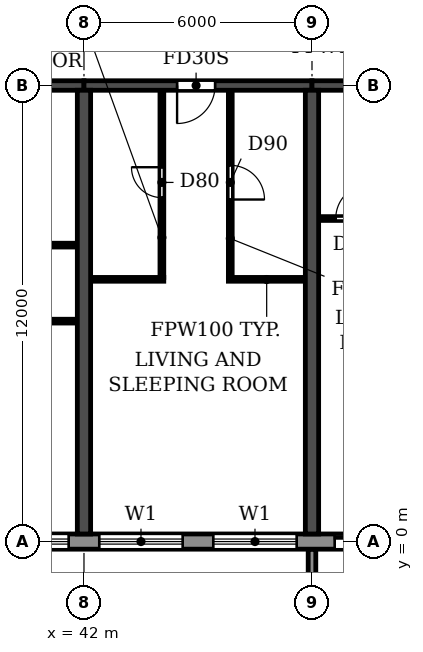
"""IFC4 building model, lengths in metres.
Left out: names, types, materials, properties, quantities, classifications, styles, units other than length and angle.
Written with IfcOpenShell. Run it as: python <this file> out.ifc"""

import sys

from ifc_helpers import new_model, si_unit, direction, frame, frame_2d, origin, place, context, subcontext, project, spatial, polyline, rectangle, outline, extrude, source, transform, mapped, element, fill, save


model = new_model("IFC4")
c1 = context("Model", 3, precision=1e-05, world=origin(), true_north=direction((0.0, 1.0)))
c2 = subcontext(c1, "Body", "Model", "MODEL_VIEW")
j1 = project(units=[si_unit("LENGTHUNIT", "METRE"), si_unit("PLANEANGLEUNIT", "RADIAN")], contexts=[c1])
p1 = place(None, origin())
s1 = spatial("IfcSite", under=j1, at=p1, CompositionType="ELEMENT")
p2 = place(p1, origin())
s2 = spatial("IfcBuilding", under=s1, at=p2, CompositionType="ELEMENT")
p3 = place(p2, frame((0.0, 0.0, 109.2)))
s3 = spatial("IfcBuildingStorey", under=s2, at=p3, CompositionType="ELEMENT", Elevation=109.2)
for number, where, z_axis, x_axis in (
    (1, (42.0, 0.2, 0.0), (0.0, 0.0, 1.0), (0.0, 1.0, 0.0)),
    (2, (48.0, 0.2, 0.0), (0.0, 0.0, 1.0), (0.0, 1.0, 0.0)),
):
    element("IfcWall", number, at=place(p3, frame(where, z_axis=z_axis, x_axis=x_axis)), inside=s3, PredefinedType="SHEAR", context=c2, shape_type="SweptSolid", body=[
        extrude(rectangle(XDim=11.675, YDim=0.35, at=frame_2d((5.837, 0.0))), origin(), (0.0, 0.0, 1.0), 3.06),
    ])
p4 = place(p3, frame((36.0, 12.0, 0.0), z_axis=(0.0, 0.0, 1.0), x_axis=(1.0, 0.0, 0.0)))
e3 = element("IfcWall", 3, at=p4, inside=s3, PredefinedType="SHEAR", context=c2, shape_type="SweptSolid", body=[
    extrude(rectangle(XDim=6.0, YDim=0.25, at=frame_2d((3.0, 0.0))), origin(), (0.0, 0.0, 1.0), 2.46),
])
p5 = place(p3, frame((42.0, 12.0, 0.0), z_axis=(0.0, 0.0, 1.0), x_axis=(1.0, 0.0, 0.0)))
e4 = element("IfcWall", 4, at=p5, inside=s3, PredefinedType="SHEAR", context=c2, shape_type="SweptSolid", body=[
    extrude(rectangle(XDim=6.0, YDim=0.25, at=frame_2d((3.0, 0.0))), origin(), (0.0, 0.0, 1.0), 2.46),
])
p6 = place(p5, frame((2.45, 0.0, 0.0)))
e5 = element("IfcOpeningElement", 5, at=p6, cuts=e4, PredefinedType="OPENING", context=c2, shape_type="SweptSolid", body=[
    extrude(rectangle(XDim=1.0, YDim=2.1, at=frame_2d((0.5, 1.05))), frame((0.0, 0.135, 0.0), z_axis=(0.0, -1.0, 0.0), x_axis=(1.0, 0.0, 0.0)), (0.0, 0.0, 1.0), 0.27),
])
p7 = place(p3, frame((48.0, 12.0, 0.0), z_axis=(0.0, 0.0, 1.0), x_axis=(1.0, 0.0, 0.0)))
e6 = element("IfcWall", 6, at=p7, inside=s3, PredefinedType="SHEAR", context=c2, shape_type="SweptSolid", body=[
    extrude(rectangle(XDim=6.0, YDim=0.25, at=frame_2d((3.0, 0.0))), origin(), (0.0, 0.0, 1.0), 2.46),
])
p8 = place(p7, frame((2.55, 0.0, 0.0)))
e7 = element("IfcOpeningElement", 7, at=p8, cuts=e6, PredefinedType="OPENING", context=c2, shape_type="SweptSolid", body=[
    extrude(rectangle(XDim=1.0, YDim=2.1, at=frame_2d((0.5, 1.05))), frame((0.0, 0.135, 0.0), z_axis=(0.0, -1.0, 0.0), x_axis=(1.0, 0.0, 0.0)), (0.0, 0.0, 1.0), 0.27),
])
p9 = place(p3, frame((16.683, 0.0, 0.0), z_axis=(0.0, 0.0, 1.0), x_axis=(1.0, 0.0, 0.0)))
e8 = element("IfcWall", 8, at=p9, inside=s3, PredefinedType="STANDARD", context=c2, shape_type="SweptSolid", body=[
    extrude(rectangle(XDim=68.634, YDim=0.4, at=frame_2d((34.317, 0.0))), origin(), (0.0, 0.0, 1.0), 3.06),
])
p10 = place(p9, frame((1.717, 0.0, 0.9)))
e9 = element("IfcOpeningElement", 9, at=p10, cuts=e8, PredefinedType="OPENING", context=c2, shape_type="SweptSolid", body=[
    extrude(rectangle(XDim=2.2, YDim=1.5, at=frame_2d((1.1, 0.75))), frame((0.0, 0.21, 0.0), z_axis=(0.0, -1.0, 0.0), x_axis=(1.0, 0.0, 0.0)), (0.0, 0.0, 1.0), 0.42),
])
p11 = place(p9, frame((4.717, 0.0, 0.9)))
e10 = element("IfcOpeningElement", 10, at=p11, cuts=e8, PredefinedType="OPENING", context=c2, shape_type="SweptSolid", body=[
    extrude(rectangle(XDim=2.2, YDim=1.5, at=frame_2d((1.1, 0.75))), frame((0.0, 0.21, 0.0), z_axis=(0.0, -1.0, 0.0), x_axis=(1.0, 0.0, 0.0)), (0.0, 0.0, 1.0), 0.42),
])
p12 = place(p9, frame((7.717, 0.0, 0.9)))
e11 = element("IfcOpeningElement", 11, at=p12, cuts=e8, PredefinedType="OPENING", context=c2, shape_type="SweptSolid", body=[
    extrude(rectangle(XDim=2.2, YDim=1.5, at=frame_2d((1.1, 0.75))), frame((0.0, 0.21, 0.0), z_axis=(0.0, -1.0, 0.0), x_axis=(1.0, 0.0, 0.0)), (0.0, 0.0, 1.0), 0.42),
])
p13 = place(p9, frame((10.917, 0.0, 0.0)))
e12 = element("IfcOpeningElement", 12, at=p13, cuts=e8, PredefinedType="OPENING", context=c2, shape_type="SweptSolid", body=[
    extrude(rectangle(XDim=1.8, YDim=2.4, at=frame_2d((0.9, 1.2))), frame((0.0, 0.21, 0.0), z_axis=(0.0, -1.0, 0.0), x_axis=(1.0, 0.0, 0.0)), (0.0, 0.0, 1.0), 0.42),
])
p14 = place(p9, frame((13.717, 0.0, 0.9)))
e13 = element("IfcOpeningElement", 13, at=p14, cuts=e8, PredefinedType="OPENING", context=c2, shape_type="SweptSolid", body=[
    extrude(rectangle(XDim=2.2, YDim=1.5, at=frame_2d((1.1, 0.75))), frame((0.0, 0.21, 0.0), z_axis=(0.0, -1.0, 0.0), x_axis=(1.0, 0.0, 0.0)), (0.0, 0.0, 1.0), 0.42),
])
p15 = place(p9, frame((16.717, 0.0, 0.9)))
e14 = element("IfcOpeningElement", 14, at=p15, cuts=e8, PredefinedType="OPENING", context=c2, shape_type="SweptSolid", body=[
    extrude(rectangle(XDim=2.2, YDim=1.5, at=frame_2d((1.1, 0.75))), frame((0.0, 0.21, 0.0), z_axis=(0.0, -1.0, 0.0), x_axis=(1.0, 0.0, 0.0)), (0.0, 0.0, 1.0), 0.42),
])
p16 = place(p9, frame((19.717, 0.0, 0.9)))
e15 = element("IfcOpeningElement", 15, at=p16, cuts=e8, PredefinedType="OPENING", context=c2, shape_type="SweptSolid", body=[
    extrude(rectangle(XDim=2.2, YDim=1.5, at=frame_2d((1.1, 0.75))), frame((0.0, 0.21, 0.0), z_axis=(0.0, -1.0, 0.0), x_axis=(1.0, 0.0, 0.0)), (0.0, 0.0, 1.0), 0.42),
])
p17 = place(p9, frame((22.717, 0.0, 0.9)))
e16 = element("IfcOpeningElement", 16, at=p17, cuts=e8, PredefinedType="OPENING", context=c2, shape_type="SweptSolid", body=[
    extrude(rectangle(XDim=2.2, YDim=1.5, at=frame_2d((1.1, 0.75))), frame((0.0, 0.21, 0.0), z_axis=(0.0, -1.0, 0.0), x_axis=(1.0, 0.0, 0.0)), (0.0, 0.0, 1.0), 0.42),
])
p18 = place(p9, frame((25.717, 0.0, 0.9)))
e17 = element("IfcOpeningElement", 17, at=p18, cuts=e8, PredefinedType="OPENING", context=c2, shape_type="SweptSolid", body=[
    extrude(rectangle(XDim=2.2, YDim=1.5, at=frame_2d((1.1, 0.75))), frame((0.0, 0.21, 0.0), z_axis=(0.0, -1.0, 0.0), x_axis=(1.0, 0.0, 0.0)), (0.0, 0.0, 1.0), 0.42),
])
p19 = place(p9, frame((28.717, 0.0, 0.9)))
e18 = element("IfcOpeningElement", 18, at=p19, cuts=e8, PredefinedType="OPENING", context=c2, shape_type="SweptSolid", body=[
    extrude(rectangle(XDim=2.2, YDim=1.5, at=frame_2d((1.1, 0.75))), frame((0.0, 0.21, 0.0), z_axis=(0.0, -1.0, 0.0), x_axis=(1.0, 0.0, 0.0)), (0.0, 0.0, 1.0), 0.42),
])
p20 = place(p9, frame((31.917, 0.0, 0.0)))
e19 = element("IfcOpeningElement", 19, at=p20, cuts=e8, PredefinedType="OPENING", context=c2, shape_type="SweptSolid", body=[
    extrude(rectangle(XDim=1.8, YDim=2.4, at=frame_2d((0.9, 1.2))), frame((0.0, 0.21, 0.0), z_axis=(0.0, -1.0, 0.0), x_axis=(1.0, 0.0, 0.0)), (0.0, 0.0, 1.0), 0.42),
])
p21 = place(p9, frame((34.717, 0.0, 0.9)))
e20 = element("IfcOpeningElement", 20, at=p21, cuts=e8, PredefinedType="OPENING", context=c2, shape_type="SweptSolid", body=[
    extrude(rectangle(XDim=2.2, YDim=1.5, at=frame_2d((1.1, 0.75))), frame((0.0, 0.21, 0.0), z_axis=(0.0, -1.0, 0.0), x_axis=(1.0, 0.0, 0.0)), (0.0, 0.0, 1.0), 0.42),
])
p22 = place(p9, frame((37.717, 0.0, 0.9)))
e21 = element("IfcOpeningElement", 21, at=p22, cuts=e8, PredefinedType="OPENING", context=c2, shape_type="SweptSolid", body=[
    extrude(rectangle(XDim=2.2, YDim=1.5, at=frame_2d((1.1, 0.75))), frame((0.0, 0.21, 0.0), z_axis=(0.0, -1.0, 0.0), x_axis=(1.0, 0.0, 0.0)), (0.0, 0.0, 1.0), 0.42),
])
p23 = place(p9, frame((40.717, 0.0, 0.9)))
e22 = element("IfcOpeningElement", 22, at=p23, cuts=e8, PredefinedType="OPENING", context=c2, shape_type="SweptSolid", body=[
    extrude(rectangle(XDim=2.2, YDim=1.5, at=frame_2d((1.1, 0.75))), frame((0.0, 0.21, 0.0), z_axis=(0.0, -1.0, 0.0), x_axis=(1.0, 0.0, 0.0)), (0.0, 0.0, 1.0), 0.42),
])
p24 = place(p9, frame((43.717, 0.0, 0.9)))
e23 = element("IfcOpeningElement", 23, at=p24, cuts=e8, PredefinedType="OPENING", context=c2, shape_type="SweptSolid", body=[
    extrude(rectangle(XDim=2.2, YDim=1.5, at=frame_2d((1.1, 0.75))), frame((0.0, 0.21, 0.0), z_axis=(0.0, -1.0, 0.0), x_axis=(1.0, 0.0, 0.0)), (0.0, 0.0, 1.0), 0.42),
])
p25 = place(p9, frame((46.917, 0.0, 0.0)))
e24 = element("IfcOpeningElement", 24, at=p25, cuts=e8, PredefinedType="OPENING", context=c2, shape_type="SweptSolid", body=[
    extrude(rectangle(XDim=1.8, YDim=2.4, at=frame_2d((0.9, 1.2))), frame((0.0, 0.21, 0.0), z_axis=(0.0, -1.0, 0.0), x_axis=(1.0, 0.0, 0.0)), (0.0, 0.0, 1.0), 0.42),
])
p26 = place(p9, frame((49.717, 0.0, 0.9)))
e25 = element("IfcOpeningElement", 25, at=p26, cuts=e8, PredefinedType="OPENING", context=c2, shape_type="SweptSolid", body=[
    extrude(rectangle(XDim=2.2, YDim=1.5, at=frame_2d((1.1, 0.75))), frame((0.0, 0.21, 0.0), z_axis=(0.0, -1.0, 0.0), x_axis=(1.0, 0.0, 0.0)), (0.0, 0.0, 1.0), 0.42),
])
p27 = place(p9, frame((52.717, 0.0, 0.9)))
e26 = element("IfcOpeningElement", 26, at=p27, cuts=e8, PredefinedType="OPENING", context=c2, shape_type="SweptSolid", body=[
    extrude(rectangle(XDim=2.2, YDim=1.5, at=frame_2d((1.1, 0.75))), frame((0.0, 0.21, 0.0), z_axis=(0.0, -1.0, 0.0), x_axis=(1.0, 0.0, 0.0)), (0.0, 0.0, 1.0), 0.42),
])
p28 = place(p9, frame((55.717, 0.0, 0.9)))
e27 = element("IfcOpeningElement", 27, at=p28, cuts=e8, PredefinedType="OPENING", context=c2, shape_type="SweptSolid", body=[
    extrude(rectangle(XDim=2.2, YDim=1.5, at=frame_2d((1.1, 0.75))), frame((0.0, 0.21, 0.0), z_axis=(0.0, -1.0, 0.0), x_axis=(1.0, 0.0, 0.0)), (0.0, 0.0, 1.0), 0.42),
])
p29 = place(p9, frame((58.717, 0.0, 0.9)))
e28 = element("IfcOpeningElement", 28, at=p29, cuts=e8, PredefinedType="OPENING", context=c2, shape_type="SweptSolid", body=[
    extrude(rectangle(XDim=2.2, YDim=1.5, at=frame_2d((1.1, 0.75))), frame((0.0, 0.21, 0.0), z_axis=(0.0, -1.0, 0.0), x_axis=(1.0, 0.0, 0.0)), (0.0, 0.0, 1.0), 0.42),
])
p30 = place(p9, frame((61.717, 0.0, 0.9)))
e29 = element("IfcOpeningElement", 29, at=p30, cuts=e8, PredefinedType="OPENING", context=c2, shape_type="SweptSolid", body=[
    extrude(rectangle(XDim=2.2, YDim=1.5, at=frame_2d((1.1, 0.75))), frame((0.0, 0.21, 0.0), z_axis=(0.0, -1.0, 0.0), x_axis=(1.0, 0.0, 0.0)), (0.0, 0.0, 1.0), 0.42),
])
p31 = place(p9, frame((64.717, 0.0, 0.9)))
e30 = element("IfcOpeningElement", 30, at=p31, cuts=e8, PredefinedType="OPENING", context=c2, shape_type="SweptSolid", body=[
    extrude(rectangle(XDim=2.2, YDim=1.5, at=frame_2d((1.1, 0.75))), frame((0.0, 0.21, 0.0), z_axis=(0.0, -1.0, 0.0), x_axis=(1.0, 0.0, 0.0)), (0.0, 0.0, 1.0), 0.42),
])
m1 = source(origin(), c2, "Body", "SweptSolid", [
    extrude(outline(polyline([(0.0, 0.0), (0.2, 0.0), (0.2, 1.65), (0.0, 1.65), (0.0, 0.0)])), origin(), (0.0, 0.0, 1.0), 3.1),
])
p32 = place(p3, frame((47.9, -1.85, 0.0)))
e31 = element("IfcWall", 31, at=p32, inside=s3, PredefinedType="STANDARD", context=c2, shape_type="MappedRepresentation", body=[
    mapped(m1, transform((0.0, 0.0, 0.0))),
])
p33 = place(p3, frame((36.185, 5.8, 0.0), z_axis=(0.0, 0.0, 1.0), x_axis=(1.0, 0.0, 0.0)))
e32 = element("IfcWall", 32, at=p33, inside=s3, PredefinedType="PARTITIONING", context=c2, shape_type="SweptSolid", body=[
    extrude(rectangle(XDim=5.63, YDim=0.1, at=frame_2d((2.815, 0.0))), origin(), (0.0, 0.0, 1.0), 3.06),
])
p34 = place(p33, frame((1.415, 0.0, 0.0)))
e33 = element("IfcOpeningElement", 33, at=p34, cuts=e32, PredefinedType="OPENING", context=c2, shape_type="SweptSolid", body=[
    extrude(rectangle(XDim=0.9, YDim=2.1, at=frame_2d((0.45, 1.05))), frame((0.0, 0.06, 0.0), z_axis=(0.0, -1.0, 0.0), x_axis=(1.0, 0.0, 0.0)), (0.0, 0.0, 1.0), 0.12),
])
p35 = place(p33, frame((3.315, 0.0, 0.0)))
e34 = element("IfcOpeningElement", 34, at=p35, cuts=e32, PredefinedType="OPENING", context=c2, shape_type="SweptSolid", body=[
    extrude(rectangle(XDim=0.9, YDim=2.1, at=frame_2d((0.45, 1.05))), frame((0.0, 0.06, 0.0), z_axis=(0.0, -1.0, 0.0), x_axis=(1.0, 0.0, 0.0)), (0.0, 0.0, 1.0), 0.12),
])
p36 = place(p3, frame((42.185, 6.9, 0.0), z_axis=(0.0, 0.0, 1.0), x_axis=(1.0, 0.0, 0.0)))
e35 = element("IfcWall", 35, at=p36, inside=s3, PredefinedType="PARTITIONING", context=c2, shape_type="SweptSolid", body=[
    extrude(rectangle(XDim=1.915, YDim=0.1, at=frame_2d((0.958, 0.0))), origin(), (0.0, 0.0, 1.0), 3.06),
])
p37 = place(p3, frame((45.8, 6.9, 0.0), z_axis=(0.0, 0.0, 1.0), x_axis=(1.0, 0.0, 0.0)))
e36 = element("IfcWall", 36, at=p37, inside=s3, PredefinedType="PARTITIONING", context=c2, shape_type="SweptSolid", body=[
    extrude(rectangle(XDim=2.015, YDim=0.1, at=frame_2d((1.007, 0.0))), origin(), (0.0, 0.0, 1.0), 3.06),
])
p38 = place(p3, frame((36.185, 7.8, 0.0), z_axis=(0.0, 0.0, 1.0), x_axis=(1.0, 0.0, 0.0)))
e37 = element("IfcWall", 37, at=p38, inside=s3, PredefinedType="PARTITIONING", context=c2, shape_type="SweptSolid", body=[
    extrude(rectangle(XDim=5.63, YDim=0.1, at=frame_2d((2.815, 0.0))), origin(), (0.0, 0.0, 1.0), 3.06),
])
p39 = place(p38, frame((0.765, 0.0, 0.0)))
e38 = element("IfcOpeningElement", 38, at=p39, cuts=e37, PredefinedType="OPENING", context=c2, shape_type="SweptSolid", body=[
    extrude(rectangle(XDim=0.8, YDim=2.1, at=frame_2d((0.4, 1.05))), frame((0.0, 0.06, 0.0), z_axis=(0.0, -1.0, 0.0), x_axis=(1.0, 0.0, 0.0)), (0.0, 0.0, 1.0), 0.12),
])
p40 = place(p38, frame((3.765, 0.0, 0.0)))
e39 = element("IfcOpeningElement", 39, at=p40, cuts=e37, PredefinedType="OPENING", context=c2, shape_type="SweptSolid", body=[
    extrude(rectangle(XDim=0.8, YDim=2.1, at=frame_2d((0.4, 1.05))), frame((0.0, 0.06, 0.0), z_axis=(0.0, -1.0, 0.0), x_axis=(1.0, 0.0, 0.0)), (0.0, 0.0, 1.0), 0.12),
])
p41 = place(p3, frame((48.185, 8.5, 0.0), z_axis=(0.0, 0.0, 1.0), x_axis=(1.0, 0.0, 0.0)))
e40 = element("IfcWall", 40, at=p41, inside=s3, PredefinedType="PARTITIONING", context=c2, shape_type="SweptSolid", body=[
    extrude(rectangle(XDim=2.015, YDim=0.1, at=frame_2d((1.007, 0.0))), origin(), (0.0, 0.0, 1.0), 3.06),
])
p42 = place(p41, frame((0.44, 0.0, 0.0)))
e41 = element("IfcOpeningElement", 41, at=p42, cuts=e40, PredefinedType="OPENING", context=c2, shape_type="SweptSolid", body=[
    extrude(rectangle(XDim=0.9, YDim=2.1, at=frame_2d((0.45, 1.05))), frame((0.0, 0.06, 0.0), z_axis=(0.0, -1.0, 0.0), x_axis=(1.0, 0.0, 0.0)), (0.0, 0.0, 1.0), 0.12),
])
p43 = place(p3, frame((44.05, 6.95, 0.0), z_axis=(0.0, 0.0, 1.0), x_axis=(0.0, 1.0, 0.0)))
e42 = element("IfcWall", 42, at=p43, inside=s3, PredefinedType="PARTITIONING", context=c2, shape_type="SweptSolid", body=[
    extrude(rectangle(XDim=4.915, YDim=0.1, at=frame_2d((2.458, 0.0))), origin(), (0.0, 0.0, 1.0), 3.06),
])
p44 = place(p43, frame((2.1, 0.0, 0.0)))
e43 = element("IfcOpeningElement", 43, at=p44, cuts=e42, PredefinedType="OPENING", context=c2, shape_type="SweptSolid", body=[
    extrude(rectangle(XDim=0.8, YDim=2.1, at=frame_2d((0.4, 1.05))), frame((0.0, 0.06, 0.0), z_axis=(0.0, -1.0, 0.0), x_axis=(1.0, 0.0, 0.0)), (0.0, 0.0, 1.0), 0.12),
])
p45 = place(p3, frame((45.85, 6.95, 0.0), z_axis=(0.0, 0.0, 1.0), x_axis=(0.0, 1.0, 0.0)))
e44 = element("IfcWall", 44, at=p45, inside=s3, PredefinedType="PARTITIONING", context=c2, shape_type="SweptSolid", body=[
    extrude(rectangle(XDim=4.915, YDim=0.1, at=frame_2d((2.458, 0.0))), origin(), (0.0, 0.0, 1.0), 3.06),
])
p46 = place(p45, frame((2.05, 0.0, 0.0)))
e45 = element("IfcOpeningElement", 45, at=p46, cuts=e44, PredefinedType="OPENING", context=c2, shape_type="SweptSolid", body=[
    extrude(rectangle(XDim=0.9, YDim=2.1, at=frame_2d((0.45, 1.05))), frame((0.0, 0.06, 0.0), z_axis=(0.0, -1.0, 0.0), x_axis=(1.0, 0.0, 0.0)), (0.0, 0.0, 1.0), 0.12),
])
p47 = place(p17, origin())
e46 = element("IfcWindow", 46, at=p47, inside=s3, PartitioningType="DOUBLE_PANEL_HORIZONTAL", PredefinedType="WINDOW", context=c2, shape_type="SweptSolid", body=[
    extrude(rectangle(XDim=2.2, YDim=1.5, at=frame_2d((1.1, 0.75))), frame((0.0, 0.03, 0.0), z_axis=(0.0, -1.0, 0.0), x_axis=(1.0, 0.0, 0.0)), (0.0, 0.0, 1.0), 0.06),
])
fill(e16, e46)
p48 = place(p18, origin())
e47 = element("IfcWindow", 47, at=p48, inside=s3, PartitioningType="DOUBLE_PANEL_HORIZONTAL", PredefinedType="WINDOW", context=c2, shape_type="SweptSolid", body=[
    extrude(rectangle(XDim=2.2, YDim=1.5, at=frame_2d((1.1, 0.75))), frame((0.0, 0.03, 0.0), z_axis=(0.0, -1.0, 0.0), x_axis=(1.0, 0.0, 0.0)), (0.0, 0.0, 1.0), 0.06),
])
fill(e17, e47)
p49 = place(p19, origin())
e48 = element("IfcWindow", 48, at=p49, inside=s3, PartitioningType="DOUBLE_PANEL_HORIZONTAL", PredefinedType="WINDOW", context=c2, shape_type="SweptSolid", body=[
    extrude(rectangle(XDim=2.2, YDim=1.5, at=frame_2d((1.1, 0.75))), frame((0.0, 0.03, 0.0), z_axis=(0.0, -1.0, 0.0), x_axis=(1.0, 0.0, 0.0)), (0.0, 0.0, 1.0), 0.06),
])
fill(e18, e48)
p50 = place(p20, origin())
e49 = element("IfcDoor", 49, at=p50, inside=s3, OperationType="DOUBLE_DOOR_SLIDING", PredefinedType="DOOR", context=c2, shape_type="SweptSolid", body=[
    extrude(rectangle(XDim=1.8, YDim=2.4, at=frame_2d((0.9, 1.2))), frame((0.0, 0.025, 0.0), z_axis=(0.0, -1.0, 0.0), x_axis=(1.0, 0.0, 0.0)), (0.0, 0.0, 1.0), 0.05),
])
fill(e19, e49)
p51 = place(p44, origin())
e50 = element("IfcDoor", 50, at=p51, inside=s3, OperationType="SINGLE_SWING_RIGHT", PredefinedType="DOOR", context=c2, shape_type="SweptSolid", body=[
    extrude(rectangle(XDim=0.8, YDim=2.1, at=frame_2d((0.4, 1.05))), frame((0.0, 0.025, 0.0), z_axis=(0.0, -1.0, 0.0), x_axis=(1.0, 0.0, 0.0)), (0.0, 0.0, 1.0), 0.05),
])
fill(e43, e50)
p52 = place(p6, frame((1.0, 0.0, 0.0), z_axis=(0.0, 0.0, 1.0), x_axis=(-1.0, 0.0, 0.0)))
e51 = element("IfcDoor", 51, at=p52, inside=s3, OperationType="SINGLE_SWING_RIGHT", PredefinedType="DOOR", context=c2, shape_type="SweptSolid", body=[
    extrude(rectangle(XDim=1.0, YDim=2.1, at=frame_2d((0.5, 1.05))), frame((0.0, 0.025, 0.0), z_axis=(0.0, -1.0, 0.0), x_axis=(1.0, 0.0, 0.0)), (0.0, 0.0, 1.0), 0.05),
])
fill(e5, e51)
p53 = place(p46, frame((0.9, 0.0, 0.0), z_axis=(0.0, 0.0, 1.0), x_axis=(-1.0, 0.0, 0.0)))
e52 = element("IfcDoor", 52, at=p53, inside=s3, OperationType="SINGLE_SWING_RIGHT", PredefinedType="DOOR", context=c2, shape_type="SweptSolid", body=[
    extrude(rectangle(XDim=0.9, YDim=2.1, at=frame_2d((0.45, 1.05))), frame((0.0, 0.025, 0.0), z_axis=(0.0, -1.0, 0.0), x_axis=(1.0, 0.0, 0.0)), (0.0, 0.0, 1.0), 0.05),
])
fill(e45, e52)
p54 = place(p42, origin())
e53 = element("IfcDoor", 53, at=p54, inside=s3, OperationType="SINGLE_SWING_RIGHT", PredefinedType="DOOR", context=c2, shape_type="SweptSolid", body=[
    extrude(rectangle(XDim=0.9, YDim=2.1, at=frame_2d((0.45, 1.05))), frame((0.0, 0.025, 0.0), z_axis=(0.0, -1.0, 0.0), x_axis=(1.0, 0.0, 0.0)), (0.0, 0.0, 1.0), 0.05),
])
fill(e41, e53)
save(model, sys.argv[1])
